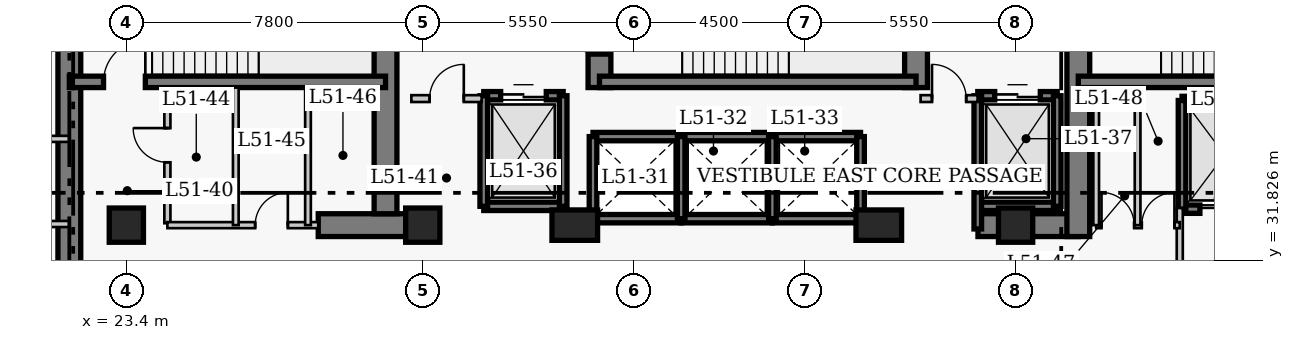
"""IFC4 building model, lengths in metres.
Left out: names, types, materials, properties, quantities, classifications, styles, units other than length and angle.
Written with IfcOpenShell. Run it as: python <this file> out.ifc"""

import sys

from ifc_helpers import new_model, si_unit, direction, frame, frame_2d, origin, origin_2d, place, context, subcontext, project, spatial, rectangle, extrude, element, fill, save


model = new_model("IFC4")
c1 = context("Model", 3, precision=1e-05, world=origin(), true_north=direction((0.0, 1.0)))
c2 = subcontext(c1, "Body", "Model", "MODEL_VIEW")
j1 = project(units=[si_unit("LENGTHUNIT", "METRE"), si_unit("PLANEANGLEUNIT", "RADIAN")], contexts=[c1])
p1 = place(None, origin())
s1 = spatial("IfcSite", under=j1, at=p1, CompositionType="ELEMENT")
p2 = place(p1, origin())
s2 = spatial("IfcBuilding", under=s1, at=p2, CompositionType="ELEMENT")
p3 = place(p2, frame((0.0, 0.0, 204.6)))
s3 = spatial("IfcBuildingStorey", under=s2, at=p3, CompositionType="ELEMENT", Elevation=204.6)
p4 = place(p3, frame((21.9, 27.05, 0.0), z_axis=(0.0, 0.0, 1.0), x_axis=(0.0, 1.0, 0.0)))
e1 = element("IfcWall", 1, at=p4, inside=s3, PredefinedType="SHEAR", context=c2, shape_type="SweptSolid", body=[
    extrude(rectangle(XDim=13.57, YDim=0.6, at=frame_2d((6.785, 0.0))), origin(), (0.0, 0.0, 1.0), 3.9),
])
p5 = place(p3, frame((28.45, 32.75, 0.0), z_axis=(0.0, 0.0, 1.0), x_axis=(1.0, 0.0, 0.0)))
e2 = element("IfcWall", 2, at=p5, inside=s3, PredefinedType="SHEAR", context=c2, shape_type="SweptSolid", body=[
    extrude(rectangle(XDim=2.4, YDim=0.6, at=frame_2d((1.2, 0.0))), origin(), (0.0, 0.0, 1.0), 3.9),
])
p6 = place(p3, frame((45.81, 32.75, 0.0), z_axis=(0.0, 0.0, 1.0), x_axis=(1.0, 0.0, 0.0)))
e3 = element("IfcWall", 3, at=p6, inside=s3, PredefinedType="SHEAR", context=c2, shape_type="SweptSolid", body=[
    extrude(rectangle(XDim=2.64, YDim=0.6, at=frame_2d((1.32, 0.0))), origin(), (0.0, 0.0, 1.0), 3.9),
])
p7 = place(p3, frame((30.22, 33.05, 0.0), z_axis=(0.0, 0.0, 1.0), x_axis=(0.0, 1.0, 0.0)))
e4 = element("IfcWall", 4, at=p7, inside=s3, PredefinedType="SHEAR", context=c2, shape_type="SweptSolid", body=[
    extrude(rectangle(XDim=7.27, YDim=0.6, at=frame_2d((3.635, 0.0))), origin(), (0.0, 0.0, 1.0), 3.9),
])
p8 = place(p3, frame((35.85, 36.37, 0.0), z_axis=(0.0, 0.0, 1.0), x_axis=(0.0, 1.0, 0.0)))
e5 = element("IfcWall", 5, at=p8, inside=s3, PredefinedType="SHEAR", context=c2, shape_type="SweptSolid", body=[
    extrude(rectangle(XDim=3.95, YDim=0.6, at=frame_2d((1.975, 0.0))), origin(), (0.0, 0.0, 1.0), 3.9),
])
p9 = place(p8, frame((0.88, 0.0, 0.0)))
e6 = element("IfcOpeningElement", 6, at=p9, cuts=e5, PredefinedType="OPENING", context=c2, shape_type="SweptSolid", body=[
    extrude(rectangle(XDim=1.1, YDim=2.15, at=frame_2d((0.55, 1.075))), frame((0.0, 0.31, 0.0), z_axis=(0.0, -1.0, 0.0), x_axis=(1.0, 0.0, 0.0)), (0.0, 0.0, 1.0), 0.62),
])
p10 = place(p3, frame((44.18, 36.37, 0.0), z_axis=(0.0, 0.0, 1.0), x_axis=(0.0, 1.0, 0.0)))
e7 = element("IfcWall", 7, at=p10, inside=s3, PredefinedType="SHEAR", context=c2, shape_type="SweptSolid", body=[
    extrude(rectangle(XDim=3.95, YDim=0.6, at=frame_2d((1.975, 0.0))), origin(), (0.0, 0.0, 1.0), 3.9),
])
p11 = place(p3, frame((48.45, 32.45, 0.0), z_axis=(0.0, 0.0, 1.0), x_axis=(0.0, 1.0, 0.0)))
e8 = element("IfcWall", 8, at=p11, inside=s3, PredefinedType="SHEAR", context=c2, shape_type="SweptSolid", body=[
    extrude(rectangle(XDim=7.87, YDim=0.6, at=frame_2d((3.935, 0.0))), origin(), (0.0, 0.0, 1.0), 3.9),
])
p12 = place(p11, frame((5.75, 0.0, 0.0)))
e9 = element("IfcOpeningElement", 9, at=p12, cuts=e8, PredefinedType="OPENING", context=c2, shape_type="SweptSolid", body=[
    extrude(rectangle(XDim=1.1, YDim=2.15, at=frame_2d((0.55, 1.075))), frame((0.0, 0.31, 0.0), z_axis=(0.0, -1.0, 0.0), x_axis=(1.0, 0.0, 0.0)), (0.0, 0.0, 1.0), 0.62),
])
p13 = place(p3, frame((21.9, 36.52, 0.0), z_axis=(0.0, 0.0, 1.0), x_axis=(1.0, 0.0, 0.0)))
e10 = element("IfcWall", 10, at=p13, inside=s3, PredefinedType="SHEAR", context=c2, shape_type="SweptSolid", body=[
    extrude(rectangle(XDim=8.32, YDim=0.3, at=frame_2d((4.16, 0.0))), origin(), (0.0, 0.0, 1.0), 3.9),
])
p14 = place(p13, frame((0.9, 0.0, 0.0)))
e11 = element("IfcOpeningElement", 11, at=p14, cuts=e10, PredefinedType="OPENING", context=c2, shape_type="SweptSolid", body=[
    extrude(rectangle(XDim=1.1, YDim=2.15, at=frame_2d((0.55, 1.075))), frame((0.0, 0.16, 0.0), z_axis=(0.0, -1.0, 0.0), x_axis=(1.0, 0.0, 0.0)), (0.0, 0.0, 1.0), 0.32),
])
p15 = place(p3, frame((35.85, 36.52, 0.0), z_axis=(0.0, 0.0, 1.0), x_axis=(1.0, 0.0, 0.0)))
e12 = element("IfcWall", 12, at=p15, inside=s3, PredefinedType="SHEAR", context=c2, shape_type="SweptSolid", body=[
    extrude(rectangle(XDim=8.33, YDim=0.3, at=frame_2d((4.165, 0.0))), origin(), (0.0, 0.0, 1.0), 3.9),
])
p16 = place(p3, frame((48.45, 36.52, 0.0), z_axis=(0.0, 0.0, 1.0), x_axis=(1.0, 0.0, 0.0)))
e13 = element("IfcWall", 13, at=p16, inside=s3, PredefinedType="SHEAR", context=c2, shape_type="SweptSolid", body=[
    extrude(rectangle(XDim=8.37, YDim=0.3, at=frame_2d((4.185, 0.0))), origin(), (0.0, 0.0, 1.0), 3.9),
])
for number, where, z_axis, x_axis in (
    (14, (23.4, 32.75, 0.0), (0.0, 0.0, 1.0), (1.0, 0.0, 0.0)),
    (15, (31.2, 32.75, 0.0), (0.0, 0.0, 1.0), (1.0, 0.0, 0.0)),
):
    element("IfcColumn", number, at=place(p3, frame(where, z_axis=z_axis, x_axis=x_axis)), inside=s3, PredefinedType="COLUMN", context=c2, shape_type="SweptSolid", body=[
        extrude(rectangle(XDim=0.9, YDim=0.9, at=origin_2d()), origin(), (0.0, 0.0, 1.0), 3.9),
    ])
for number, where, z_axis, x_axis in (
    (16, (35.2, 32.75, 0.0), (0.0, 0.0, 1.0), (1.0, 0.0, 0.0)),
    (17, (43.2, 32.75, 0.0), (0.0, 0.0, 1.0), (1.0, 0.0, 0.0)),
):
    element("IfcColumn", number, at=place(p3, frame(where, z_axis=z_axis, x_axis=x_axis)), inside=s3, PredefinedType="COLUMN", context=c2, shape_type="SweptSolid", body=[
        extrude(rectangle(XDim=1.2, YDim=0.8, at=origin_2d()), origin(), (0.0, 0.0, 1.0), 3.9),
    ])
p17 = place(p3, frame((46.8, 32.75, 0.0), z_axis=(0.0, 0.0, 1.0), x_axis=(1.0, 0.0, 0.0)))
e18 = element("IfcColumn", 18, at=p17, inside=s3, PredefinedType="COLUMN", context=c2, shape_type="SweptSolid", body=[
    extrude(rectangle(XDim=0.9, YDim=0.9, at=origin_2d()), origin(), (0.0, 0.0, 1.0), 3.9),
])
for number, where, z_axis, x_axis in (
    (19, (35.68, 35.08, 0.0), (0.0, 0.0, 1.0), (1.0, 0.0, 0.0)),
    (20, (35.68, 32.92, 0.0), (0.0, 0.0, 1.0), (1.0, 0.0, 0.0)),
):
    element("IfcWall", number, at=place(p3, frame(where, z_axis=z_axis, x_axis=x_axis)), inside=s3, PredefinedType="SHEAR", context=c2, shape_type="SweptSolid", body=[
        extrude(rectangle(XDim=2.32, YDim=0.22, at=frame_2d((1.16, 0.0))), origin(), (0.0, 0.0, 1.0), 3.9),
    ])
p18 = place(p3, frame((35.68, 32.92, 0.0), z_axis=(0.0, 0.0, 1.0), x_axis=(0.0, 1.0, 0.0)))
e21 = element("IfcWall", 21, at=p18, inside=s3, PredefinedType="SHEAR", context=c2, shape_type="SweptSolid", body=[
    extrude(rectangle(XDim=2.16, YDim=0.2, at=frame_2d((1.08, 0.0))), origin(), (0.0, 0.0, 1.0), 3.9),
])
for number, where, z_axis, x_axis in (
    (22, (38.0, 35.08, 0.0), (0.0, 0.0, 1.0), (1.0, 0.0, 0.0)),
    (23, (38.0, 32.92, 0.0), (0.0, 0.0, 1.0), (1.0, 0.0, 0.0)),
):
    element("IfcWall", number, at=place(p3, frame(where, z_axis=z_axis, x_axis=x_axis)), inside=s3, PredefinedType="SHEAR", context=c2, shape_type="SweptSolid", body=[
        extrude(rectangle(XDim=2.4, YDim=0.22, at=frame_2d((1.2, 0.0))), origin(), (0.0, 0.0, 1.0), 3.9),
    ])
p19 = place(p3, frame((38.0, 32.92, 0.0), z_axis=(0.0, 0.0, 1.0), x_axis=(0.0, 1.0, 0.0)))
e24 = element("IfcWall", 24, at=p19, inside=s3, PredefinedType="SHEAR", context=c2, shape_type="SweptSolid", body=[
    extrude(rectangle(XDim=2.16, YDim=0.2, at=frame_2d((1.08, 0.0))), origin(), (0.0, 0.0, 1.0), 3.9),
])
for number, where, z_axis, x_axis in (
    (25, (40.4, 35.08, 0.0), (0.0, 0.0, 1.0), (1.0, 0.0, 0.0)),
    (26, (40.4, 32.92, 0.0), (0.0, 0.0, 1.0), (1.0, 0.0, 0.0)),
):
    element("IfcWall", number, at=place(p3, frame(where, z_axis=z_axis, x_axis=x_axis)), inside=s3, PredefinedType="SHEAR", context=c2, shape_type="SweptSolid", body=[
        extrude(rectangle(XDim=2.32, YDim=0.22, at=frame_2d((1.16, 0.0))), origin(), (0.0, 0.0, 1.0), 3.9),
    ])
for number, where, z_axis, x_axis in (
    (27, (40.4, 32.92, 0.0), (0.0, 0.0, 1.0), (0.0, 1.0, 0.0)),
    (28, (42.72, 32.92, 0.0), (0.0, 0.0, 1.0), (0.0, 1.0, 0.0)),
):
    element("IfcWall", number, at=place(p3, frame(where, z_axis=z_axis, x_axis=x_axis)), inside=s3, PredefinedType="SHEAR", context=c2, shape_type="SweptSolid", body=[
        extrude(rectangle(XDim=2.16, YDim=0.2, at=frame_2d((1.08, 0.0))), origin(), (0.0, 0.0, 1.0), 3.9),
    ])
p20 = place(p3, frame((51.18, 36.03, 0.0), z_axis=(0.0, 0.0, 1.0), x_axis=(1.0, 0.0, 0.0)))
e29 = element("IfcWall", 29, at=p20, inside=s3, PredefinedType="SHEAR", context=c2, shape_type="SweptSolid", body=[
    extrude(rectangle(XDim=2.42, YDim=0.22, at=frame_2d((1.21, 0.0))), origin(), (0.0, 0.0, 1.0), 3.9),
])
p21 = place(p3, frame((51.18, 33.17, 0.0), z_axis=(0.0, 0.0, 1.0), x_axis=(1.0, 0.0, 0.0)))
e30 = element("IfcWall", 30, at=p21, inside=s3, PredefinedType="SHEAR", context=c2, shape_type="SweptSolid", body=[
    extrude(rectangle(XDim=2.42, YDim=0.22, at=frame_2d((1.21, 0.0))), origin(), (0.0, 0.0, 1.0), 3.9),
])
p22 = place(p21, frame((0.47, 0.0, 0.0)))
e31 = element("IfcOpeningElement", 31, at=p22, cuts=e30, PredefinedType="OPENING", context=c2, shape_type="SweptSolid", body=[
    extrude(rectangle(XDim=1.3, YDim=2.15, at=frame_2d((0.65, 1.075))), frame((0.0, 0.12, 0.0), z_axis=(0.0, -1.0, 0.0), x_axis=(1.0, 0.0, 0.0)), (0.0, 0.0, 1.0), 0.24),
])
p23 = place(p3, frame((51.18, 33.17, 0.0), z_axis=(0.0, 0.0, 1.0), x_axis=(0.0, 1.0, 0.0)))
e32 = element("IfcWall", 32, at=p23, inside=s3, PredefinedType="SHEAR", context=c2, shape_type="SweptSolid", body=[
    extrude(rectangle(XDim=2.86, YDim=0.2, at=frame_2d((1.43, 0.0))), origin(), (0.0, 0.0, 1.0), 3.9),
])
p24 = place(p3, frame((32.805, 36.155, 0.0), z_axis=(0.0, 0.0, 1.0), x_axis=(1.0, 0.0, 0.0)))
e33 = element("IfcWall", 33, at=p24, inside=s3, PredefinedType="SHEAR", context=c2, shape_type="SweptSolid", body=[
    extrude(rectangle(XDim=2.09, YDim=0.22, at=frame_2d((1.045, 0.0))), origin(), (0.0, 0.0, 1.0), 3.9),
])
p25 = place(p24, frame((0.445, 0.0, 0.0)))
e34 = element("IfcOpeningElement", 34, at=p25, cuts=e33, PredefinedType="OPENING", context=c2, shape_type="SweptSolid", body=[
    extrude(rectangle(XDim=1.2, YDim=2.15, at=frame_2d((0.6, 1.075))), frame((0.0, 0.12, 0.0), z_axis=(0.0, -1.0, 0.0), x_axis=(1.0, 0.0, 0.0)), (0.0, 0.0, 1.0), 0.24),
])
p26 = place(p3, frame((32.805, 33.245, 0.0), z_axis=(0.0, 0.0, 1.0), x_axis=(1.0, 0.0, 0.0)))
e35 = element("IfcWall", 35, at=p26, inside=s3, PredefinedType="SHEAR", context=c2, shape_type="SweptSolid", body=[
    extrude(rectangle(XDim=2.09, YDim=0.22, at=frame_2d((1.045, 0.0))), origin(), (0.0, 0.0, 1.0), 3.9),
])
for number, where, z_axis, x_axis in (
    (36, (32.805, 33.245, 0.0), (0.0, 0.0, 1.0), (0.0, 1.0, 0.0)),
    (37, (34.895, 33.245, 0.0), (0.0, 0.0, 1.0), (0.0, 1.0, 0.0)),
):
    element("IfcWall", number, at=place(p3, frame(where, z_axis=z_axis, x_axis=x_axis)), inside=s3, PredefinedType="SHEAR", context=c2, shape_type="SweptSolid", body=[
        extrude(rectangle(XDim=2.91, YDim=0.2, at=frame_2d((1.455, 0.0))), origin(), (0.0, 0.0, 1.0), 3.9),
    ])
p27 = place(p3, frame((45.805, 36.155, 0.0), z_axis=(0.0, 0.0, 1.0), x_axis=(1.0, 0.0, 0.0)))
e38 = element("IfcWall", 38, at=p27, inside=s3, PredefinedType="SHEAR", context=c2, shape_type="SweptSolid", body=[
    extrude(rectangle(XDim=2.09, YDim=0.22, at=frame_2d((1.045, 0.0))), origin(), (0.0, 0.0, 1.0), 3.9),
])
p28 = place(p27, frame((0.445, 0.0, 0.0)))
e39 = element("IfcOpeningElement", 39, at=p28, cuts=e38, PredefinedType="OPENING", context=c2, shape_type="SweptSolid", body=[
    extrude(rectangle(XDim=1.2, YDim=2.15, at=frame_2d((0.6, 1.075))), frame((0.0, 0.12, 0.0), z_axis=(0.0, -1.0, 0.0), x_axis=(1.0, 0.0, 0.0)), (0.0, 0.0, 1.0), 0.24),
])
p29 = place(p3, frame((45.805, 33.245, 0.0), z_axis=(0.0, 0.0, 1.0), x_axis=(1.0, 0.0, 0.0)))
e40 = element("IfcWall", 40, at=p29, inside=s3, PredefinedType="SHEAR", context=c2, shape_type="SweptSolid", body=[
    extrude(rectangle(XDim=2.09, YDim=0.22, at=frame_2d((1.045, 0.0))), origin(), (0.0, 0.0, 1.0), 3.9),
])
p30 = place(p3, frame((45.805, 32.65, 0.0), z_axis=(0.0, 0.0, 1.0), x_axis=(0.0, 1.0, 0.0)))
e41 = element("IfcWall", 41, at=p30, inside=s3, PredefinedType="SHEAR", context=c2, shape_type="SweptSolid", body=[
    extrude(rectangle(XDim=3.505, YDim=0.2, at=frame_2d((1.752, 0.0))), origin(), (0.0, 0.0, 1.0), 3.9),
])
p31 = place(p3, frame((47.895, 33.245, 0.0), z_axis=(0.0, 0.0, 1.0), x_axis=(0.0, 1.0, 0.0)))
e42 = element("IfcWall", 42, at=p31, inside=s3, PredefinedType="SHEAR", context=c2, shape_type="SweptSolid", body=[
    extrude(rectangle(XDim=2.91, YDim=0.2, at=frame_2d((1.455, 0.0))), origin(), (0.0, 0.0, 1.0), 3.9),
])
p32 = place(p3, frame((30.9, 36.08, 0.0), z_axis=(0.0, 0.0, 1.0), x_axis=(1.0, 0.0, 0.0)))
e43 = element("IfcWall", 43, at=p32, inside=s3, PredefinedType="PARTITIONING", context=c2, shape_type="SweptSolid", body=[
    extrude(rectangle(XDim=1.85, YDim=0.18, at=frame_2d((0.925, 0.0))), origin(), (0.0, 0.0, 1.0), 3.65),
])
p33 = place(p32, frame((0.48, 0.0, 0.0)))
e44 = element("IfcOpeningElement", 44, at=p33, cuts=e43, PredefinedType="OPENING", context=c2, shape_type="SweptSolid", body=[
    extrude(rectangle(XDim=0.9, YDim=2.15, at=frame_2d((0.45, 1.075))), frame((0.0, 0.1, 0.0), z_axis=(0.0, -1.0, 0.0), x_axis=(1.0, 0.0, 0.0)), (0.0, 0.0, 1.0), 0.2),
])
p34 = place(p3, frame((44.3, 36.08, 0.0), z_axis=(0.0, 0.0, 1.0), x_axis=(1.0, 0.0, 0.0)))
e45 = element("IfcWall", 45, at=p34, inside=s3, PredefinedType="PARTITIONING", context=c2, shape_type="SweptSolid", body=[
    extrude(rectangle(XDim=1.5, YDim=0.18, at=frame_2d((0.75, 0.0))), origin(), (0.0, 0.0, 1.0), 3.65),
])
p35 = place(p34, frame((0.3, 0.0, 0.0)))
e46 = element("IfcOpeningElement", 46, at=p35, cuts=e45, PredefinedType="OPENING", context=c2, shape_type="SweptSolid", body=[
    extrude(rectangle(XDim=0.9, YDim=2.15, at=frame_2d((0.45, 1.075))), frame((0.0, 0.1, 0.0), z_axis=(0.0, -1.0, 0.0), x_axis=(1.0, 0.0, 0.0)), (0.0, 0.0, 1.0), 0.2),
])
p36 = place(p3, frame((24.48, 32.8, 0.0), z_axis=(0.0, 0.0, 1.0), x_axis=(0.0, 1.0, 0.0)))
e47 = element("IfcWall", 47, at=p36, inside=s3, PredefinedType="PARTITIONING", context=c2, shape_type="SweptSolid", body=[
    extrude(rectangle(XDim=3.57, YDim=0.16, at=frame_2d((1.785, 0.0))), origin(), (0.0, 0.0, 1.0), 3.65),
])
p37 = place(p36, frame((1.604, 0.0, 0.0)))
e48 = element("IfcOpeningElement", 48, at=p37, cuts=e47, PredefinedType="OPENING", context=c2, shape_type="SweptSolid", body=[
    extrude(rectangle(XDim=0.9, YDim=2.1, at=frame_2d((0.45, 1.05))), frame((0.0, 0.09, 0.0), z_axis=(0.0, -1.0, 0.0), x_axis=(1.0, 0.0, 0.0)), (0.0, 0.0, 1.0), 0.18),
])
p38 = place(p3, frame((51.12, 29.5, 0.0), z_axis=(0.0, 0.0, 1.0), x_axis=(0.0, 1.0, 0.0)))
e49 = element("IfcWall", 49, at=p38, inside=s3, PredefinedType="PARTITIONING", context=c2, shape_type="SweptSolid", body=[
    extrude(rectangle(XDim=3.7, YDim=0.16, at=frame_2d((1.85, 0.0))), origin(), (0.0, 0.0, 1.0), 3.65),
])
p39 = place(p38, frame((0.9, 0.0, 0.0)))
e50 = element("IfcOpeningElement", 50, at=p39, cuts=e49, PredefinedType="OPENING", context=c2, shape_type="SweptSolid", body=[
    extrude(rectangle(XDim=1.1, YDim=2.15, at=frame_2d((0.55, 1.075))), frame((0.0, 0.09, 0.0), z_axis=(0.0, -1.0, 0.0), x_axis=(1.0, 0.0, 0.0)), (0.0, 0.0, 1.0), 0.18),
])
p40 = place(p3, frame((24.48, 32.75, 0.0), z_axis=(0.0, 0.0, 1.0), x_axis=(1.0, 0.0, 0.0)))
e51 = element("IfcWall", 51, at=p40, inside=s3, PredefinedType="PARTITIONING", context=c2, shape_type="SweptSolid", body=[
    extrude(rectangle(XDim=3.97, YDim=0.16, at=frame_2d((1.985, 0.0))), origin(), (0.0, 0.0, 1.0), 3.65),
])
p41 = place(p40, frame((2.31, 0.0, 0.0)))
e52 = element("IfcOpeningElement", 52, at=p41, cuts=e51, PredefinedType="OPENING", context=c2, shape_type="SweptSolid", body=[
    extrude(rectangle(XDim=0.86, YDim=2.05, at=frame_2d((0.43, 1.025))), frame((0.0, 0.09, 0.0), z_axis=(0.0, -1.0, 0.0), x_axis=(1.0, 0.0, 0.0)), (0.0, 0.0, 1.0), 0.18),
])
p42 = place(p3, frame((48.92, 32.75, 0.0), z_axis=(0.0, 0.0, 1.0), x_axis=(1.0, 0.0, 0.0)))
e53 = element("IfcWall", 53, at=p42, inside=s3, PredefinedType="PARTITIONING", context=c2, shape_type="SweptSolid", body=[
    extrude(rectangle(XDim=2.2, YDim=0.16, at=frame_2d((1.1, 0.0))), origin(), (0.0, 0.0, 1.0), 3.65),
])
p43 = place(p42, frame((0.14, 0.0, 0.0)))
e54 = element("IfcOpeningElement", 54, at=p43, cuts=e53, PredefinedType="OPENING", context=c2, shape_type="SweptSolid", body=[
    extrude(rectangle(XDim=0.86, YDim=2.05, at=frame_2d((0.43, 1.025))), frame((0.0, 0.09, 0.0), z_axis=(0.0, -1.0, 0.0), x_axis=(1.0, 0.0, 0.0)), (0.0, 0.0, 1.0), 0.18),
])
p44 = place(p42, frame((1.2, 0.0, 0.0)))
e55 = element("IfcOpeningElement", 55, at=p44, cuts=e53, PredefinedType="OPENING", context=c2, shape_type="SweptSolid", body=[
    extrude(rectangle(XDim=0.86, YDim=2.05, at=frame_2d((0.43, 1.025))), frame((0.0, 0.09, 0.0), z_axis=(0.0, -1.0, 0.0), x_axis=(1.0, 0.0, 0.0)), (0.0, 0.0, 1.0), 0.18),
])
for number, where, z_axis, x_axis in (
    (56, (48.92, 32.75, 0.0), (0.0, 0.0, 1.0), (0.0, 1.0, 0.0)),
    (57, (26.28, 32.75, 0.0), (0.0, 0.0, 1.0), (0.0, 1.0, 0.0)),
    (58, (28.18, 32.75, 0.0), (0.0, 0.0, 1.0), (0.0, 1.0, 0.0)),
    (59, (50.01, 32.75, 0.0), (0.0, 0.0, 1.0), (0.0, 1.0, 0.0)),
):
    element("IfcWall", number, at=place(p3, frame(where, z_axis=z_axis, x_axis=x_axis)), inside=s3, PredefinedType="PARTITIONING", context=c2, shape_type="SweptSolid", body=[
        extrude(rectangle(XDim=3.62, YDim=0.15, at=frame_2d((1.81, 0.0))), origin(), (0.0, 0.0, 1.0), 3.65),
    ])
for number, where, z_axis, x_axis in (
    (60, (18.86, 35.02, 0.0), (0.0, 0.0, 1.0), (1.0, 0.0, 0.0)),
    (61, (18.86, 32.78, 0.0), (0.0, 0.0, 1.0), (1.0, 0.0, 0.0)),
):
    element("IfcWall", number, at=place(p3, frame(where, z_axis=z_axis, x_axis=x_axis)), inside=s3, PredefinedType="PARTITIONING", context=c2, shape_type="SweptSolid", body=[
        extrude(rectangle(XDim=3.04, YDim=0.16, at=frame_2d((1.52, 0.0))), origin(), (0.0, 0.0, 1.0), 3.65),
    ])
p45 = place(p22, origin())
e62 = element("IfcDoor", 62, at=p45, inside=s3, OperationType="DOUBLE_DOOR_SLIDING", PredefinedType="DOOR", context=c2, shape_type="SweptSolid", body=[
    extrude(rectangle(XDim=1.3, YDim=2.15, at=frame_2d((0.65, 1.075))), frame((0.0, 0.025, 0.0), z_axis=(0.0, -1.0, 0.0), x_axis=(1.0, 0.0, 0.0)), (0.0, 0.0, 1.0), 0.05),
])
fill(e31, e62)
p46 = place(p25, origin())
e63 = element("IfcDoor", 63, at=p46, inside=s3, OperationType="DOUBLE_DOOR_SLIDING", PredefinedType="DOOR", context=c2, shape_type="SweptSolid", body=[
    extrude(rectangle(XDim=1.2, YDim=2.15, at=frame_2d((0.6, 1.075))), frame((0.0, 0.025, 0.0), z_axis=(0.0, -1.0, 0.0), x_axis=(1.0, 0.0, 0.0)), (0.0, 0.0, 1.0), 0.05),
])
fill(e34, e63)
p47 = place(p28, origin())
e64 = element("IfcDoor", 64, at=p47, inside=s3, OperationType="DOUBLE_DOOR_SLIDING", PredefinedType="DOOR", context=c2, shape_type="SweptSolid", body=[
    extrude(rectangle(XDim=1.2, YDim=2.15, at=frame_2d((0.6, 1.075))), frame((0.0, 0.025, 0.0), z_axis=(0.0, -1.0, 0.0), x_axis=(1.0, 0.0, 0.0)), (0.0, 0.0, 1.0), 0.05),
])
fill(e39, e64)
p48 = place(p33, origin())
e65 = element("IfcDoor", 65, at=p48, inside=s3, OperationType="SINGLE_SWING_RIGHT", PredefinedType="DOOR", context=c2, shape_type="SweptSolid", body=[
    extrude(rectangle(XDim=0.9, YDim=2.15, at=frame_2d((0.45, 1.075))), frame((0.0, 0.025, 0.0), z_axis=(0.0, -1.0, 0.0), x_axis=(1.0, 0.0, 0.0)), (0.0, 0.0, 1.0), 0.05),
])
fill(e44, e65)
p49 = place(p35, origin())
e66 = element("IfcDoor", 66, at=p49, inside=s3, OperationType="SINGLE_SWING_LEFT", PredefinedType="DOOR", context=c2, shape_type="SweptSolid", body=[
    extrude(rectangle(XDim=0.9, YDim=2.15, at=frame_2d((0.45, 1.075))), frame((0.0, 0.025, 0.0), z_axis=(0.0, -1.0, 0.0), x_axis=(1.0, 0.0, 0.0)), (0.0, 0.0, 1.0), 0.05),
])
fill(e46, e66)
p50 = place(p37, origin())
e67 = element("IfcDoor", 67, at=p50, inside=s3, OperationType="SINGLE_SWING_RIGHT", PredefinedType="DOOR", context=c2, shape_type="SweptSolid", body=[
    extrude(rectangle(XDim=0.9, YDim=2.1, at=frame_2d((0.45, 1.05))), frame((0.0, 0.025, 0.0), z_axis=(0.0, -1.0, 0.0), x_axis=(1.0, 0.0, 0.0)), (0.0, 0.0, 1.0), 0.05),
])
fill(e48, e67)
p51 = place(p41, origin())
e68 = element("IfcDoor", 68, at=p51, inside=s3, OperationType="SINGLE_SWING_RIGHT", PredefinedType="DOOR", context=c2, shape_type="SweptSolid", body=[
    extrude(rectangle(XDim=0.86, YDim=2.05, at=frame_2d((0.43, 1.025))), frame((0.0, 0.025, 0.0), z_axis=(0.0, -1.0, 0.0), x_axis=(1.0, 0.0, 0.0)), (0.0, 0.0, 1.0), 0.05),
])
fill(e52, e68)
p52 = place(p43, origin())
e69 = element("IfcDoor", 69, at=p52, inside=s3, OperationType="SINGLE_SWING_LEFT", PredefinedType="DOOR", context=c2, shape_type="SweptSolid", body=[
    extrude(rectangle(XDim=0.86, YDim=2.05, at=frame_2d((0.43, 1.025))), frame((0.0, 0.025, 0.0), z_axis=(0.0, -1.0, 0.0), x_axis=(1.0, 0.0, 0.0)), (0.0, 0.0, 1.0), 0.05),
])
fill(e54, e69)
p53 = place(p44, origin())
e70 = element("IfcDoor", 70, at=p53, inside=s3, OperationType="SINGLE_SWING_RIGHT", PredefinedType="DOOR", context=c2, shape_type="SweptSolid", body=[
    extrude(rectangle(XDim=0.86, YDim=2.05, at=frame_2d((0.43, 1.025))), frame((0.0, 0.025, 0.0), z_axis=(0.0, -1.0, 0.0), x_axis=(1.0, 0.0, 0.0)), (0.0, 0.0, 1.0), 0.05),
])
fill(e55, e70)
p54 = place(p14, origin())
e71 = element("IfcDoor", 71, at=p54, inside=s3, OperationType="SINGLE_SWING_RIGHT", PredefinedType="DOOR", context=c2, shape_type="SweptSolid", body=[
    extrude(rectangle(XDim=1.1, YDim=2.15, at=frame_2d((0.55, 1.075))), frame((0.0, 0.025, 0.0), z_axis=(0.0, -1.0, 0.0), x_axis=(1.0, 0.0, 0.0)), (0.0, 0.0, 1.0), 0.05),
])
fill(e11, e71)
p55 = place(p9, origin())
e72 = element("IfcDoor", 72, at=p55, inside=s3, OperationType="SINGLE_SWING_RIGHT", PredefinedType="DOOR", context=c2, shape_type="SweptSolid", body=[
    extrude(rectangle(XDim=1.1, YDim=2.15, at=frame_2d((0.55, 1.075))), frame((0.0, 0.025, 0.0), z_axis=(0.0, -1.0, 0.0), x_axis=(1.0, 0.0, 0.0)), (0.0, 0.0, 1.0), 0.05),
])
fill(e6, e72)
save(model, sys.argv[1])
